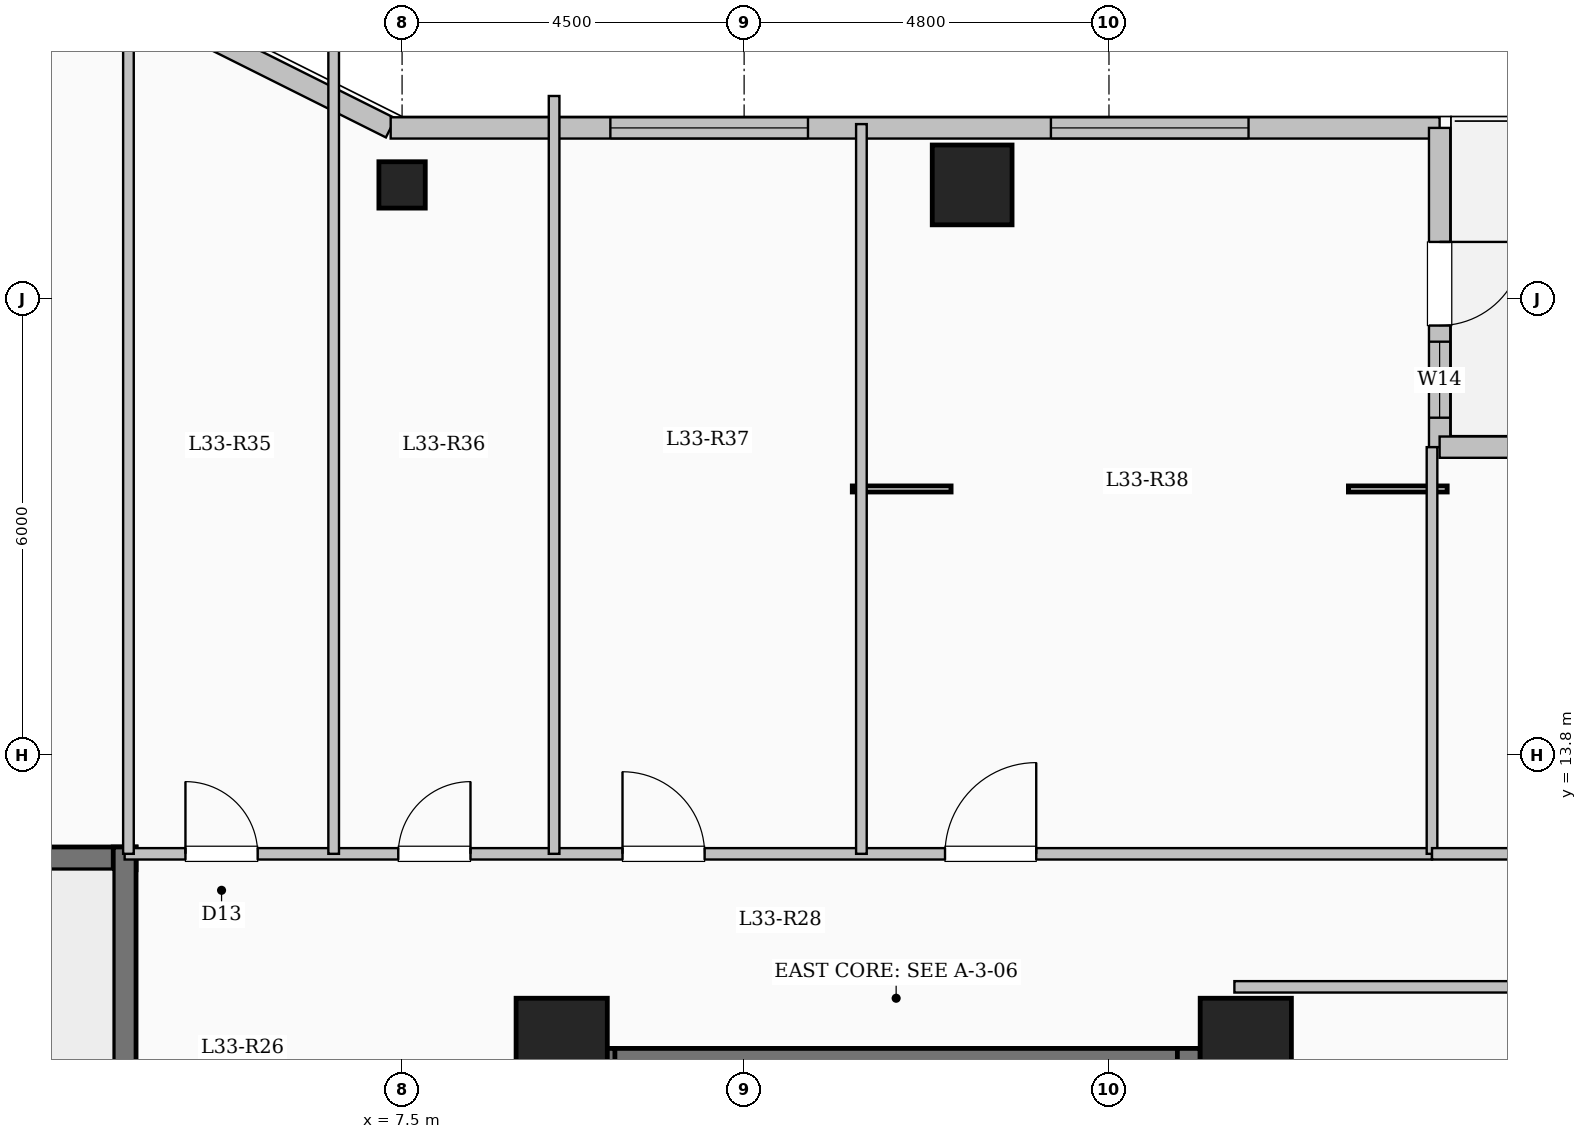
"""IFC4 building model, lengths in metres.
Left out: names, types, materials, properties, quantities, classifications, styles, units other than length and angle.
Written with IfcOpenShell. Run it as: python <this file> out.ifc"""

import sys

from ifc_helpers import new_model, si_unit, direction, frame, frame_2d, origin, origin_2d, place, context, subcontext, project, spatial, rectangle, hollow_circle, extrude, element, fill, save


model = new_model("IFC4")
c1 = context("Model", 3, precision=1e-05, world=origin(), true_north=direction((0.0, 1.0)))
c2 = subcontext(c1, "Body", "Model", "MODEL_VIEW")
j1 = project(units=[si_unit("LENGTHUNIT", "METRE"), si_unit("PLANEANGLEUNIT", "RADIAN")], contexts=[c1])
p1 = place(None, origin())
s1 = spatial("IfcSite", under=j1, at=p1, CompositionType="ELEMENT")
p2 = place(p1, origin())
s2 = spatial("IfcBuilding", under=s1, at=p2, CompositionType="ELEMENT")
p3 = place(p2, frame((0.0, 0.0, 123.0)))
s3 = spatial("IfcBuildingStorey", under=s2, at=p3, CompositionType="ELEMENT", Elevation=123.0)
for number, where, z_axis, x_axis in (
    (1, (9.6, 10.0, 0.0), (0.0, 0.0, 1.0), (1.0, 0.0, 0.0)),
    (2, (18.6, 10.0, 0.0), (0.0, 0.0, 1.0), (1.0, 0.0, 0.0)),
):
    element("IfcColumn", number, at=place(p3, frame(where, z_axis=z_axis, x_axis=x_axis)), inside=s3, PredefinedType="COLUMN", context=c2, shape_type="SweptSolid", body=[
        extrude(rectangle(XDim=1.2, YDim=1.2, at=origin_2d()), origin(), (0.0, 0.0, 1.0), 4.5),
    ])
p4 = place(p3, frame((7.5, 21.3, 0.0), z_axis=(0.0, 0.0, 1.0), x_axis=(1.0, 0.0, 0.0)))
e3 = element("IfcColumn", 3, at=p4, inside=s3, PredefinedType="COLUMN", context=c2, shape_type="SweptSolid", body=[
    extrude(hollow_circle(Radius=0.305, WallThickness=0.025, at=origin_2d()), origin(), (0.0, 0.0, 1.0), 4.5),
])
p5 = place(p3, frame((15.0, 21.3, 0.0), z_axis=(0.0, 0.0, 1.0), x_axis=(1.0, 0.0, 0.0)))
e4 = element("IfcColumn", 4, at=p5, inside=s3, PredefinedType="COLUMN", context=c2, shape_type="SweptSolid", body=[
    extrude(rectangle(XDim=1.05, YDim=1.05, at=origin_2d()), origin(), (0.0, 0.0, 1.0), 4.5),
])
p6 = place(p3, frame((4.35, 23.55, 0.0), z_axis=(0.0, 0.0, 1.0), x_axis=(0.894427191, -0.4472135955, 0.0)))
e5 = element("IfcWall", 5, at=p6, inside=s3, PredefinedType="SOLIDWALL", context=c2, shape_type="SweptSolid", body=[
    extrude(rectangle(XDim=3.354, YDim=0.28, at=frame_2d((1.677, 0.0))), origin(), (0.0, 0.0, 1.0), 4.2),
])
p7 = place(p3, frame((7.35, 22.05, 0.0), z_axis=(0.0, 0.0, 1.0), x_axis=(1.0, 0.0, 0.0)))
e6 = element("IfcWall", 6, at=p7, inside=s3, PredefinedType="SOLIDWALL", context=c2, shape_type="SweptSolid", body=[
    extrude(rectangle(XDim=13.8, YDim=0.28, at=frame_2d((6.9, 0.0))), origin(), (0.0, 0.0, 1.0), 4.2),
])
p8 = place(p7, frame((2.89, 0.0, 0.85)))
e7 = element("IfcOpeningElement", 7, at=p8, cuts=e6, PredefinedType="OPENING", context=c2, shape_type="SweptSolid", body=[
    extrude(rectangle(XDim=2.6, YDim=2.4, at=frame_2d((1.3, 1.2))), frame((0.0, 0.15, 0.0), z_axis=(0.0, -1.0, 0.0), x_axis=(1.0, 0.0, 0.0)), (0.0, 0.0, 1.0), 0.3),
])
p9 = place(p7, frame((8.686, 0.0, 0.85)))
e8 = element("IfcOpeningElement", 8, at=p9, cuts=e6, PredefinedType="OPENING", context=c2, shape_type="SweptSolid", body=[
    extrude(rectangle(XDim=2.6, YDim=2.4, at=frame_2d((1.3, 1.2))), frame((0.0, 0.15, 0.0), z_axis=(0.0, -1.0, 0.0), x_axis=(1.0, 0.0, 0.0)), (0.0, 0.0, 1.0), 0.3),
])
p10 = place(p3, frame((21.15, 22.05, 0.0), z_axis=(0.0, 0.0, 1.0), x_axis=(0.0, -1.0, 0.0)))
e9 = element("IfcWall", 9, at=p10, inside=s3, PredefinedType="SOLIDWALL", context=c2, shape_type="SweptSolid", body=[
    extrude(rectangle(XDim=4.2, YDim=0.28, at=frame_2d((2.1, 0.0))), origin(), (0.0, 0.0, 1.0), 4.2),
])
p11 = place(p10, frame((1.5, 0.0, 0.0)))
e10 = element("IfcOpeningElement", 10, at=p11, cuts=e9, PredefinedType="OPENING", context=c2, shape_type="SweptSolid", body=[
    extrude(rectangle(XDim=1.1, YDim=2.2, at=frame_2d((0.55, 1.1))), frame((0.0, 0.15, 0.0), z_axis=(0.0, -1.0, 0.0), x_axis=(1.0, 0.0, 0.0)), (0.0, 0.0, 1.0), 0.3),
])
p12 = place(p10, frame((2.812, 0.0, 0.95)))
e11 = element("IfcOpeningElement", 11, at=p12, cuts=e9, PredefinedType="OPENING", context=c2, shape_type="SweptSolid", body=[
    extrude(rectangle(XDim=1.0, YDim=1.5, at=frame_2d((0.5, 0.75))), frame((0.0, 0.15, 0.0), z_axis=(0.0, -1.0, 0.0), x_axis=(1.0, 0.0, 0.0)), (0.0, 0.0, 1.0), 0.3),
])
p13 = place(p3, frame((21.15, 17.85, 0.0), z_axis=(0.0, 0.0, 1.0), x_axis=(1.0, 0.0, 0.0)))
e12 = element("IfcWall", 12, at=p13, inside=s3, PredefinedType="SOLIDWALL", context=c2, shape_type="SweptSolid", body=[
    extrude(rectangle(XDim=5.7, YDim=0.28, at=frame_2d((2.85, 0.0))), origin(), (0.0, 0.0, 1.0), 4.2),
])
p14 = place(p13, frame((1.525, 0.0, 0.85)))
e13 = element("IfcOpeningElement", 13, at=p14, cuts=e12, PredefinedType="OPENING", context=c2, shape_type="SweptSolid", body=[
    extrude(rectangle(XDim=2.6, YDim=2.4, at=frame_2d((1.3, 1.2))), frame((0.0, 0.15, 0.0), z_axis=(0.0, -1.0, 0.0), x_axis=(1.0, 0.0, 0.0)), (0.0, 0.0, 1.0), 0.3),
])
p15 = place(p3, frame((10.0, 9.79, 0.0), z_axis=(0.0, 0.0, 1.0), x_axis=(1.0, 0.0, 0.0)))
e14 = element("IfcWall", 14, at=p15, inside=s3, PredefinedType="SHEAR", context=c2, shape_type="SweptSolid", body=[
    extrude(rectangle(XDim=8.0, YDim=0.3, at=frame_2d((4.0, 0.0))), origin(), (0.0, 0.0, 1.0), 4.5),
])
for number, where, z_axis, x_axis in (
    (15, (10.15, 6.35, 0.0), (0.0, 0.0, 1.0), (0.0, 1.0, 0.0)),
    (16, (17.85, 6.35, 0.0), (0.0, 0.0, 1.0), (0.0, 1.0, 0.0)),
):
    element("IfcWall", number, at=place(p3, frame(where, z_axis=z_axis, x_axis=x_axis)), inside=s3, PredefinedType="SHEAR", context=c2, shape_type="SweptSolid", body=[
        extrude(rectangle(XDim=3.59, YDim=0.3, at=frame_2d((1.795, 0.0))), origin(), (0.0, 0.0, 1.0), 4.5),
    ])
p16 = place(p3, frame((-4.0, 12.44, 0.0), z_axis=(0.0, 0.0, 1.0), x_axis=(1.0, 0.0, 0.0)))
e17 = element("IfcWall", 17, at=p16, inside=s3, PredefinedType="SHEAR", context=c2, shape_type="SweptSolid", body=[
    extrude(rectangle(XDim=8.0, YDim=0.3, at=frame_2d((4.0, 0.0))), origin(), (0.0, 0.0, 1.0), 4.5),
])
p17 = place(p3, frame((3.85, 9.0, 0.0), z_axis=(0.0, 0.0, 1.0), x_axis=(0.0, 1.0, 0.0)))
e18 = element("IfcWall", 18, at=p17, inside=s3, PredefinedType="SHEAR", context=c2, shape_type="SweptSolid", body=[
    extrude(rectangle(XDim=3.59, YDim=0.3, at=frame_2d((1.795, 0.0))), origin(), (0.0, 0.0, 1.0), 4.5),
])
p18 = place(p3, frame((3.85, 12.5, 0.0), z_axis=(0.0, 0.0, 1.0), x_axis=(1.0, 0.0, 0.0)))
e19 = element("IfcWall", 19, at=p18, inside=s3, PredefinedType="PARTITIONING", context=c2, shape_type="SweptSolid", body=[
    extrude(rectangle(XDim=17.2, YDim=0.15, at=frame_2d((8.6, 0.0))), origin(), (0.0, 0.0, 1.0), 4.2),
])
p19 = place(p18, frame((0.8, 0.0, 0.0)))
e20 = element("IfcOpeningElement", 20, at=p19, cuts=e19, PredefinedType="OPENING", context=c2, shape_type="SweptSolid", body=[
    extrude(rectangle(XDim=0.95, YDim=2.15, at=frame_2d((0.475, 1.075))), frame((0.0, 0.085, 0.0), z_axis=(0.0, -1.0, 0.0), x_axis=(1.0, 0.0, 0.0)), (0.0, 0.0, 1.0), 0.17),
])
p20 = place(p18, frame((3.6, 0.0, 0.0)))
e21 = element("IfcOpeningElement", 21, at=p20, cuts=e19, PredefinedType="OPENING", context=c2, shape_type="SweptSolid", body=[
    extrude(rectangle(XDim=0.95, YDim=2.15, at=frame_2d((0.475, 1.075))), frame((0.0, 0.085, 0.0), z_axis=(0.0, -1.0, 0.0), x_axis=(1.0, 0.0, 0.0)), (0.0, 0.0, 1.0), 0.17),
])
p21 = place(p18, frame((6.55, 0.0, 0.0)))
e22 = element("IfcOpeningElement", 22, at=p21, cuts=e19, PredefinedType="OPENING", context=c2, shape_type="SweptSolid", body=[
    extrude(rectangle(XDim=1.08, YDim=2.15, at=frame_2d((0.54, 1.075))), frame((0.0, 0.085, 0.0), z_axis=(0.0, -1.0, 0.0), x_axis=(1.0, 0.0, 0.0)), (0.0, 0.0, 1.0), 0.17),
])
p22 = place(p18, frame((10.793, 0.0, 0.0)))
e23 = element("IfcOpeningElement", 23, at=p22, cuts=e19, PredefinedType="OPENING", context=c2, shape_type="SweptSolid", body=[
    extrude(rectangle(XDim=1.2, YDim=2.15, at=frame_2d((0.6, 1.075))), frame((0.0, 0.085, 0.0), z_axis=(0.0, -1.0, 0.0), x_axis=(1.0, 0.0, 0.0)), (0.0, 0.0, 1.0), 0.17),
])
p23 = place(p3, frame((3.9, 12.5, 0.0), z_axis=(0.0, 0.0, 1.0), x_axis=(0.0, 1.0, 0.0)))
e24 = element("IfcWall", 24, at=p23, inside=s3, PredefinedType="PARTITIONING", context=c2, shape_type="SweptSolid", body=[
    extrude(rectangle(XDim=11.08, YDim=0.14, at=frame_2d((5.54, 0.0))), origin(), (0.0, 0.0, 1.0), 4.2),
])
p24 = place(p3, frame((6.6, 12.5, 0.0), z_axis=(0.0, 0.0, 1.0), x_axis=(0.0, 1.0, 0.0)))
e25 = element("IfcWall", 25, at=p24, inside=s3, PredefinedType="PARTITIONING", context=c2, shape_type="SweptSolid", body=[
    extrude(rectangle(XDim=10.685, YDim=0.14, at=frame_2d((5.343, 0.0))), origin(), (0.0, 0.0, 1.0), 4.2),
])
p25 = place(p3, frame((9.5, 12.5, 0.0), z_axis=(0.0, 0.0, 1.0), x_axis=(0.0, 1.0, 0.0)))
e26 = element("IfcWall", 26, at=p25, inside=s3, PredefinedType="PARTITIONING", context=c2, shape_type="SweptSolid", body=[
    extrude(rectangle(XDim=9.97, YDim=0.14, at=frame_2d((4.985, 0.0))), origin(), (0.0, 0.0, 1.0), 4.2),
])
p26 = place(p3, frame((13.543, 12.5, 0.0), z_axis=(0.0, 0.0, 1.0), x_axis=(0.0, 1.0, 0.0)))
e27 = element("IfcWall", 27, at=p26, inside=s3, PredefinedType="PARTITIONING", context=c2, shape_type="SweptSolid", body=[
    extrude(rectangle(XDim=9.6, YDim=0.14, at=frame_2d((4.8, 0.0))), origin(), (0.0, 0.0, 1.0), 4.2),
])
p27 = place(p3, frame((18.45, 10.75, 0.0), z_axis=(0.0, 0.0, 1.0), x_axis=(1.0, 0.0, 0.0)))
e28 = element("IfcWall", 28, at=p27, inside=s3, PredefinedType="PARTITIONING", context=c2, shape_type="SweptSolid", body=[
    extrude(rectangle(XDim=8.43, YDim=0.15, at=frame_2d((4.215, 0.0))), origin(), (0.0, 0.0, 1.0), 4.2),
])
p28 = place(p3, frame((21.05, 12.5, 0.0), z_axis=(0.0, 0.0, 1.0), x_axis=(0.0, 1.0, 0.0)))
e29 = element("IfcWall", 29, at=p28, inside=s3, PredefinedType="PARTITIONING", context=c2, shape_type="SweptSolid", body=[
    extrude(rectangle(XDim=5.35, YDim=0.14, at=frame_2d((2.675, 0.0))), origin(), (0.0, 0.0, 1.0), 4.2),
])
p29 = place(p3, frame((21.05, 12.5, 0.0), z_axis=(0.0, 0.0, 1.0), x_axis=(1.0, 0.0, 0.0)))
e30 = element("IfcWall", 30, at=p29, inside=s3, PredefinedType="PARTITIONING", context=c2, shape_type="SweptSolid", body=[
    extrude(rectangle(XDim=5.83, YDim=0.15, at=frame_2d((2.915, 0.0))), origin(), (0.0, 0.0, 1.0), 4.2),
])
p30 = place(p29, frame((2.44, 0.0, 0.0)))
e31 = element("IfcOpeningElement", 31, at=p30, cuts=e30, PredefinedType="OPENING", context=c2, shape_type="SweptSolid", body=[
    extrude(rectangle(XDim=0.95, YDim=2.15, at=frame_2d((0.475, 1.075))), frame((0.0, 0.085, 0.0), z_axis=(0.0, -1.0, 0.0), x_axis=(1.0, 0.0, 0.0)), (0.0, 0.0, 1.0), 0.17),
])
p31 = place(p8, origin())
e32 = element("IfcWindow", 32, at=p31, inside=s3, PartitioningType="SINGLE_PANEL", PredefinedType="WINDOW", context=c2, shape_type="SweptSolid", body=[
    extrude(rectangle(XDim=2.6, YDim=2.4, at=frame_2d((1.3, 1.2))), frame((0.0, 0.03, 0.0), z_axis=(0.0, -1.0, 0.0), x_axis=(1.0, 0.0, 0.0)), (0.0, 0.0, 1.0), 0.06),
])
fill(e7, e32)
p32 = place(p9, origin())
e33 = element("IfcWindow", 33, at=p32, inside=s3, PartitioningType="SINGLE_PANEL", PredefinedType="WINDOW", context=c2, shape_type="SweptSolid", body=[
    extrude(rectangle(XDim=2.6, YDim=2.4, at=frame_2d((1.3, 1.2))), frame((0.0, 0.03, 0.0), z_axis=(0.0, -1.0, 0.0), x_axis=(1.0, 0.0, 0.0)), (0.0, 0.0, 1.0), 0.06),
])
fill(e8, e33)
p33 = place(p11, origin())
e34 = element("IfcDoor", 34, at=p33, inside=s3, OperationType="SINGLE_SWING_LEFT", PredefinedType="DOOR", context=c2, shape_type="SweptSolid", body=[
    extrude(rectangle(XDim=1.1, YDim=2.2, at=frame_2d((0.55, 1.1))), frame((0.0, 0.025, 0.0), z_axis=(0.0, -1.0, 0.0), x_axis=(1.0, 0.0, 0.0)), (0.0, 0.0, 1.0), 0.05),
])
fill(e10, e34)
p34 = place(p12, origin())
e35 = element("IfcWindow", 35, at=p34, inside=s3, PartitioningType="SINGLE_PANEL", PredefinedType="WINDOW", context=c2, shape_type="SweptSolid", body=[
    extrude(rectangle(XDim=1.0, YDim=1.5, at=frame_2d((0.5, 0.75))), frame((0.0, 0.03, 0.0), z_axis=(0.0, -1.0, 0.0), x_axis=(1.0, 0.0, 0.0)), (0.0, 0.0, 1.0), 0.06),
])
fill(e11, e35)
p35 = place(p19, origin())
e36 = element("IfcDoor", 36, at=p35, inside=s3, OperationType="SINGLE_SWING_LEFT", PredefinedType="DOOR", context=c2, shape_type="SweptSolid", body=[
    extrude(rectangle(XDim=0.95, YDim=2.15, at=frame_2d((0.475, 1.075))), frame((0.0, 0.025, 0.0), z_axis=(0.0, -1.0, 0.0), x_axis=(1.0, 0.0, 0.0)), (0.0, 0.0, 1.0), 0.05),
])
fill(e20, e36)
p36 = place(p20, origin())
e37 = element("IfcDoor", 37, at=p36, inside=s3, OperationType="SINGLE_SWING_RIGHT", PredefinedType="DOOR", context=c2, shape_type="SweptSolid", body=[
    extrude(rectangle(XDim=0.95, YDim=2.15, at=frame_2d((0.475, 1.075))), frame((0.0, 0.025, 0.0), z_axis=(0.0, -1.0, 0.0), x_axis=(1.0, 0.0, 0.0)), (0.0, 0.0, 1.0), 0.05),
])
fill(e21, e37)
p37 = place(p21, origin())
e38 = element("IfcDoor", 38, at=p37, inside=s3, OperationType="SINGLE_SWING_LEFT", PredefinedType="DOOR", context=c2, shape_type="SweptSolid", body=[
    extrude(rectangle(XDim=1.08, YDim=2.15, at=frame_2d((0.54, 1.075))), frame((0.0, 0.025, 0.0), z_axis=(0.0, -1.0, 0.0), x_axis=(1.0, 0.0, 0.0)), (0.0, 0.0, 1.0), 0.05),
])
fill(e22, e38)
p38 = place(p22, origin())
e39 = element("IfcDoor", 39, at=p38, inside=s3, OperationType="SINGLE_SWING_RIGHT", PredefinedType="DOOR", context=c2, shape_type="SweptSolid", body=[
    extrude(rectangle(XDim=1.2, YDim=2.15, at=frame_2d((0.6, 1.075))), frame((0.0, 0.025, 0.0), z_axis=(0.0, -1.0, 0.0), x_axis=(1.0, 0.0, 0.0)), (0.0, 0.0, 1.0), 0.05),
])
fill(e23, e39)
save(model, sys.argv[1])
